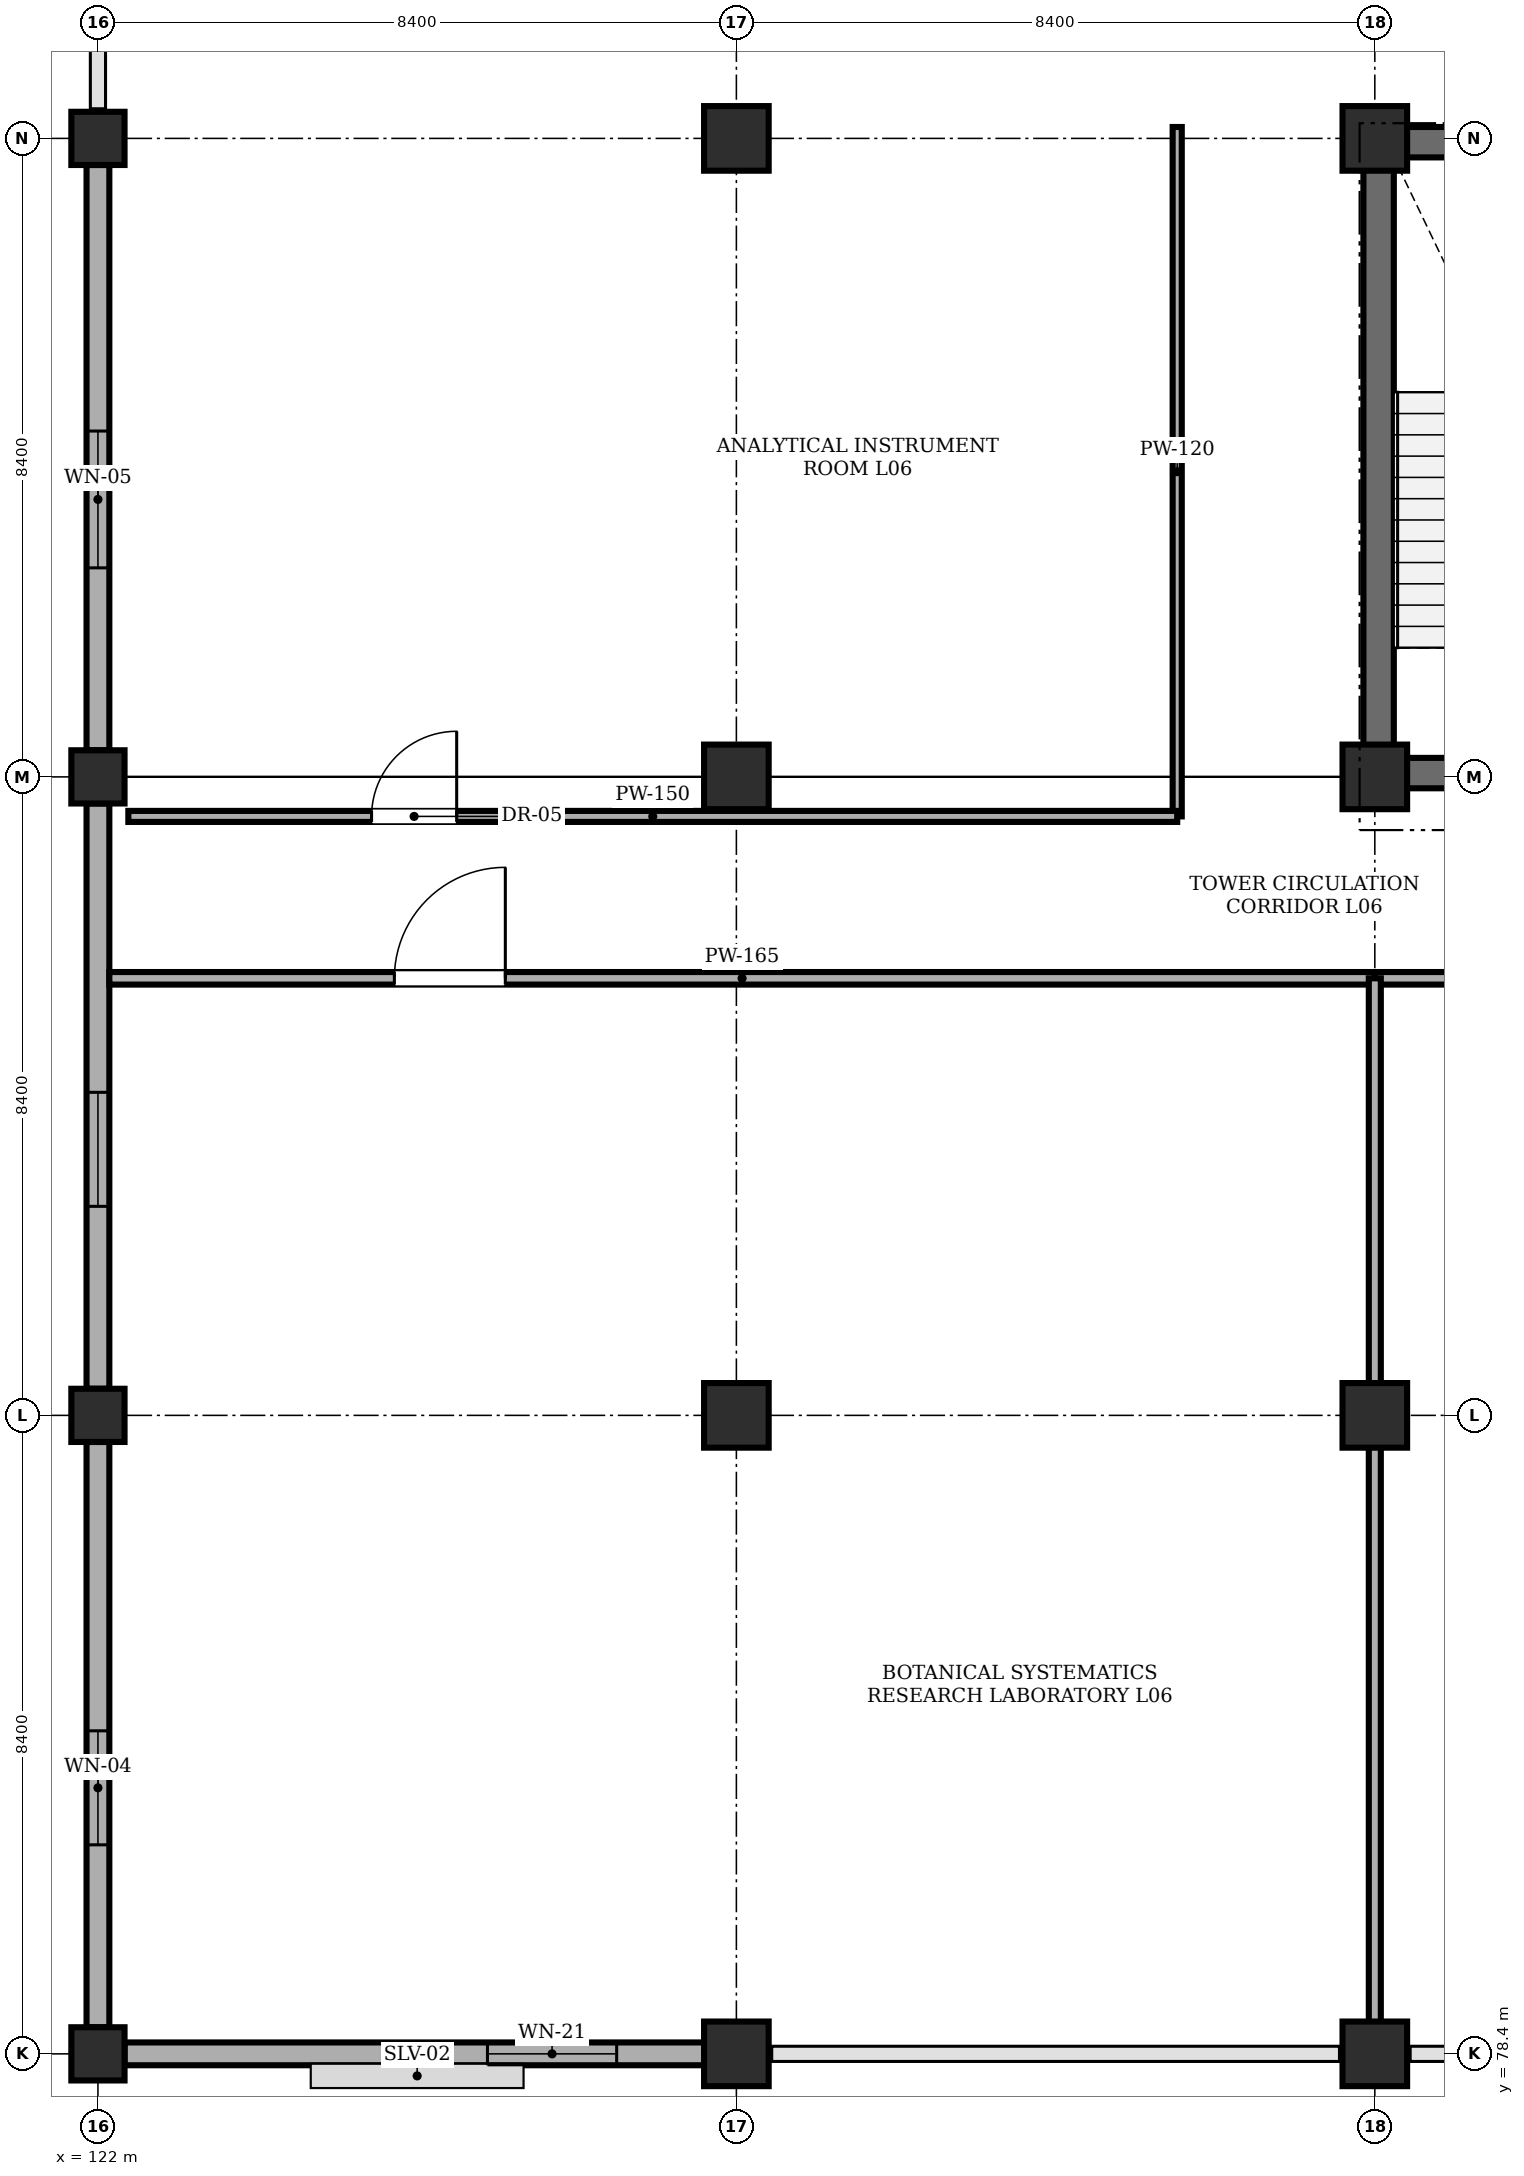
"""IFC4 building model, lengths in metres.
Left out: names, types, materials, properties, quantities, classifications, styles, units other than length and angle.
Written with IfcOpenShell. Run it as: python <this file> out.ifc"""

import sys

from ifc_helpers import new_model, si_unit, direction, frame, frame_2d, origin, origin_2d, place, context, subcontext, project, spatial, rectangle, extrude, element, fill, save


model = new_model("IFC4")
c1 = context("Model", 3, precision=1e-05, world=origin(), true_north=direction((0.0, 1.0)))
c2 = subcontext(c1, "Body", "Model", "MODEL_VIEW")
j1 = project(units=[si_unit("LENGTHUNIT", "METRE"), si_unit("PLANEANGLEUNIT", "RADIAN")], contexts=[c1])
p1 = place(None, origin())
s1 = spatial("IfcSite", under=j1, at=p1, CompositionType="ELEMENT")
p2 = place(p1, origin())
s2 = spatial("IfcBuilding", under=s1, at=p2, CompositionType="ELEMENT")
p3 = place(p2, frame((0.0, 0.0, 23.4)))
s3 = spatial("IfcBuildingStorey", under=s2, at=p3, CompositionType="ELEMENT", Elevation=23.4)
for number, where, z_axis, x_axis in (
    (1, (122.0, 78.4, 0.0), (0.0, 0.0, 1.0), (1.0, 0.0, 0.0)),
    (2, (122.0, 86.8, 0.0), (0.0, 0.0, 1.0), (1.0, 0.0, 0.0)),
    (3, (122.0, 95.2, 0.0), (0.0, 0.0, 1.0), (1.0, 0.0, 0.0)),
    (4, (122.0, 103.6, 0.0), (0.0, 0.0, 1.0), (1.0, 0.0, 0.0)),
):
    element("IfcColumn", number, at=place(p3, frame(where, z_axis=z_axis, x_axis=x_axis)), inside=s3, PredefinedType="COLUMN", context=c2, shape_type="SweptSolid", body=[
        extrude(rectangle(XDim=0.7, YDim=0.7, at=origin_2d()), origin(), (0.0, 0.0, 1.0), 4.0),
    ])
for number, where, z_axis, x_axis in (
    (5, (130.4, 78.4, 0.0), (0.0, 0.0, 1.0), (1.0, 0.0, 0.0)),
    (6, (130.4, 86.8, 0.0), (0.0, 0.0, 1.0), (1.0, 0.0, 0.0)),
    (7, (130.4, 95.2, 0.0), (0.0, 0.0, 1.0), (1.0, 0.0, 0.0)),
    (8, (130.4, 103.6, 0.0), (0.0, 0.0, 1.0), (1.0, 0.0, 0.0)),
    (9, (138.8, 78.4, 0.0), (0.0, 0.0, 1.0), (1.0, 0.0, 0.0)),
    (10, (138.8, 86.8, 0.0), (0.0, 0.0, 1.0), (1.0, 0.0, 0.0)),
    (11, (138.8, 95.2, 0.0), (0.0, 0.0, 1.0), (1.0, 0.0, 0.0)),
    (12, (138.8, 103.6, 0.0), (0.0, 0.0, 1.0), (1.0, 0.0, 0.0)),
):
    element("IfcColumn", number, at=place(p3, frame(where, z_axis=z_axis, x_axis=x_axis)), inside=s3, PredefinedType="COLUMN", context=c2, shape_type="SweptSolid", body=[
        extrude(rectangle(XDim=0.85, YDim=0.85, at=origin_2d()), origin(), (0.0, 0.0, 1.0), 4.0),
    ])
for number, where, z_axis, x_axis in (
    (13, (138.65, 95.25, 0.0), (0.0, 0.0, 1.0), (1.0, 0.0, 0.0)),
    (14, (138.65, 103.55, 0.0), (0.0, 0.0, 1.0), (1.0, 0.0, 0.0)),
):
    element("IfcWall", number, at=place(p3, frame(where, z_axis=z_axis, x_axis=x_axis)), inside=s3, PredefinedType="SHEAR", context=c2, shape_type="SweptSolid", body=[
        extrude(rectangle(XDim=3.9, YDim=0.4, at=frame_2d((1.95, 0.0))), origin(), (0.0, 0.0, 1.0), 4.0),
    ])
p4 = place(p3, frame((138.85, 95.45, 0.0), z_axis=(0.0, 0.0, 1.0), x_axis=(0.0, 1.0, 0.0)))
e15 = element("IfcWall", 15, at=p4, inside=s3, PredefinedType="SHEAR", context=c2, shape_type="SweptSolid", body=[
    extrude(rectangle(XDim=7.9, YDim=0.4, at=frame_2d((3.95, 0.0))), origin(), (0.0, 0.0, 1.0), 4.0),
])
p5 = place(p3, frame((129.975, 78.4, 0.0), z_axis=(0.0, 0.0, 1.0), x_axis=(-1.0, 0.0, 0.0)))
e16 = element("IfcWall", 16, at=p5, inside=s3, PredefinedType="STANDARD", context=c2, shape_type="SweptSolid", body=[
    extrude(rectangle(XDim=7.625, YDim=0.3, at=frame_2d((3.812, 0.0))), origin(), (0.0, 0.0, 1.0), 4.0),
])
p6 = place(p5, frame((1.15, 0.0, 0.95)))
e17 = element("IfcOpeningElement", 17, at=p6, cuts=e16, PredefinedType="OPENING", context=c2, shape_type="SweptSolid", body=[
    extrude(rectangle(XDim=1.7, YDim=2.05, at=frame_2d((0.85, 1.025))), frame((0.0, 0.16, 0.0), z_axis=(0.0, -1.0, 0.0), x_axis=(1.0, 0.0, 0.0)), (0.0, 0.0, 1.0), 0.32),
])
p7 = place(p3, frame((122.0, 78.75, 0.0), z_axis=(0.0, 0.0, 1.0), x_axis=(0.0, 1.0, 0.0)))
e18 = element("IfcWall", 18, at=p7, inside=s3, PredefinedType="STANDARD", context=c2, shape_type="SweptSolid", body=[
    extrude(rectangle(XDim=7.7, YDim=0.3, at=frame_2d((3.85, 0.0))), origin(), (0.0, 0.0, 1.0), 4.0),
])
p8 = place(p7, frame((2.4, 0.0, 0.95)))
e19 = element("IfcOpeningElement", 19, at=p8, cuts=e18, PredefinedType="OPENING", context=c2, shape_type="SweptSolid", body=[
    extrude(rectangle(XDim=1.5, YDim=1.8, at=frame_2d((0.75, 0.9))), frame((0.0, 0.16, 0.0), z_axis=(0.0, -1.0, 0.0), x_axis=(1.0, 0.0, 0.0)), (0.0, 0.0, 1.0), 0.32),
])
p9 = place(p3, frame((122.0, 87.15, 0.0), z_axis=(0.0, 0.0, 1.0), x_axis=(0.0, 1.0, 0.0)))
e20 = element("IfcWall", 20, at=p9, inside=s3, PredefinedType="STANDARD", context=c2, shape_type="SweptSolid", body=[
    extrude(rectangle(XDim=7.7, YDim=0.3, at=frame_2d((3.85, 0.0))), origin(), (0.0, 0.0, 1.0), 3.3),
])
p10 = place(p9, frame((2.4, 0.0, 0.95)))
e21 = element("IfcOpeningElement", 21, at=p10, cuts=e20, PredefinedType="OPENING", context=c2, shape_type="SweptSolid", body=[
    extrude(rectangle(XDim=1.5, YDim=1.8, at=frame_2d((0.75, 0.9))), frame((0.0, 0.16, 0.0), z_axis=(0.0, -1.0, 0.0), x_axis=(1.0, 0.0, 0.0)), (0.0, 0.0, 1.0), 0.32),
])
p11 = place(p3, frame((122.0, 95.55, 0.0), z_axis=(0.0, 0.0, 1.0), x_axis=(0.0, 1.0, 0.0)))
e22 = element("IfcWall", 22, at=p11, inside=s3, PredefinedType="STANDARD", context=c2, shape_type="SweptSolid", body=[
    extrude(rectangle(XDim=7.7, YDim=0.3, at=frame_2d((3.85, 0.0))), origin(), (0.0, 0.0, 1.0), 3.3),
])
p12 = place(p11, frame((2.4, 0.0, 1.0)))
e23 = element("IfcOpeningElement", 23, at=p12, cuts=e22, PredefinedType="OPENING", context=c2, shape_type="SweptSolid", body=[
    extrude(rectangle(XDim=1.8, YDim=1.8, at=frame_2d((0.9, 0.9))), frame((0.0, 0.16, 0.0), z_axis=(0.0, -1.0, 0.0), x_axis=(1.0, 0.0, 0.0)), (0.0, 0.0, 1.0), 0.32),
])
p13 = place(p3, frame((136.2, 94.68, 0.0), z_axis=(0.0, 0.0, 1.0), x_axis=(0.0, 1.0, 0.0)))
e24 = element("IfcWall", 24, at=p13, inside=s3, PredefinedType="PARTITIONING", context=c2, shape_type="SweptSolid", body=[
    extrude(rectangle(XDim=9.07, YDim=0.12, at=frame_2d((4.535, 0.0))), origin(), (0.0, 0.0, 1.0), 4.0),
])
p14 = place(p3, frame((122.4, 94.68, 0.0), z_axis=(0.0, 0.0, 1.0), x_axis=(1.0, 0.0, 0.0)))
e25 = element("IfcWall", 25, at=p14, inside=s3, PredefinedType="PARTITIONING", context=c2, shape_type="SweptSolid", body=[
    extrude(rectangle(XDim=13.8, YDim=0.145, at=frame_2d((6.9, 0.0))), origin(), (0.0, 0.0, 1.0), 4.0),
])
p15 = place(p14, frame((3.2, 0.0, 0.0)))
e26 = element("IfcOpeningElement", 26, at=p15, cuts=e25, PredefinedType="OPENING", context=c2, shape_type="SweptSolid", body=[
    extrude(rectangle(XDim=1.12, YDim=2.18, at=frame_2d((0.56, 1.09))), frame((0.0, 0.083, 0.0), z_axis=(0.0, -1.0, 0.0), x_axis=(1.0, 0.0, 0.0)), (0.0, 0.0, 1.0), 0.165),
])
p16 = place(p3, frame((122.15, 92.55, 0.0), z_axis=(0.0, 0.0, 1.0), x_axis=(1.0, 0.0, 0.0)))
e27 = element("IfcWall", 27, at=p16, inside=s3, PredefinedType="PARTITIONING", context=c2, shape_type="SweptSolid", body=[
    extrude(rectangle(XDim=16.65, YDim=0.165, at=frame_2d((8.325, 0.0))), origin(), (0.0, 0.0, 1.0), 4.0),
])
p17 = place(p16, frame((3.75, 0.0, 0.0)))
e28 = element("IfcOpeningElement", 28, at=p17, cuts=e27, PredefinedType="OPENING", context=c2, shape_type="SweptSolid", body=[
    extrude(rectangle(XDim=1.46, YDim=2.22, at=frame_2d((0.73, 1.11))), frame((0.0, 0.093, 0.0), z_axis=(0.0, -1.0, 0.0), x_axis=(1.0, 0.0, 0.0)), (0.0, 0.0, 1.0), 0.185),
])
p18 = place(p3, frame((138.8, 92.55, 0.0), z_axis=(0.0, 0.0, 1.0), x_axis=(1.0, 0.0, 0.0)))
e29 = element("IfcWall", 29, at=p18, inside=s3, PredefinedType="PARTITIONING", context=c2, shape_type="SweptSolid", body=[
    extrude(rectangle(XDim=8.4, YDim=0.165, at=frame_2d((4.2, 0.0))), origin(), (0.0, 0.0, 1.0), 4.0),
])
p19 = place(p18, frame((3.4, 0.0, 0.0)))
e30 = element("IfcOpeningElement", 30, at=p19, cuts=e29, PredefinedType="OPENING", context=c2, shape_type="SweptSolid", body=[
    extrude(rectangle(XDim=1.12, YDim=2.18, at=frame_2d((0.56, 1.09))), frame((0.0, 0.093, 0.0), z_axis=(0.0, -1.0, 0.0), x_axis=(1.0, 0.0, 0.0)), (0.0, 0.0, 1.0), 0.185),
])
p20 = place(p3, frame((138.8, 78.55, 0.0), z_axis=(0.0, 0.0, 1.0), x_axis=(0.0, 1.0, 0.0)))
e31 = element("IfcWall", 31, at=p20, inside=s3, PredefinedType="PARTITIONING", context=c2, shape_type="SweptSolid", body=[
    extrude(rectangle(XDim=14.0, YDim=0.158, at=frame_2d((7.0, 0.0))), origin(), (0.0, 0.0, 1.0), 3.3),
])
p21 = place(p6, origin())
e32 = element("IfcWindow", 32, at=p21, inside=s3, PartitioningType="DOUBLE_PANEL_VERTICAL", PredefinedType="WINDOW", context=c2, shape_type="SweptSolid", body=[
    extrude(rectangle(XDim=1.7, YDim=2.05, at=frame_2d((0.85, 1.025))), frame((0.0, 0.03, 0.0), z_axis=(0.0, -1.0, 0.0), x_axis=(1.0, 0.0, 0.0)), (0.0, 0.0, 1.0), 0.06),
])
fill(e17, e32)
p22 = place(p8, origin())
e33 = element("IfcWindow", 33, at=p22, inside=s3, PartitioningType="DOUBLE_PANEL_VERTICAL", PredefinedType="WINDOW", context=c2, shape_type="SweptSolid", body=[
    extrude(rectangle(XDim=1.5, YDim=1.8, at=frame_2d((0.75, 0.9))), frame((0.0, 0.03, 0.0), z_axis=(0.0, -1.0, 0.0), x_axis=(1.0, 0.0, 0.0)), (0.0, 0.0, 1.0), 0.06),
])
fill(e19, e33)
p23 = place(p10, origin())
e34 = element("IfcWindow", 34, at=p23, inside=s3, PartitioningType="DOUBLE_PANEL_VERTICAL", PredefinedType="WINDOW", context=c2, shape_type="SweptSolid", body=[
    extrude(rectangle(XDim=1.5, YDim=1.8, at=frame_2d((0.75, 0.9))), frame((0.0, 0.03, 0.0), z_axis=(0.0, -1.0, 0.0), x_axis=(1.0, 0.0, 0.0)), (0.0, 0.0, 1.0), 0.06),
])
fill(e21, e34)
p24 = place(p12, origin())
e35 = element("IfcWindow", 35, at=p24, inside=s3, PartitioningType="DOUBLE_PANEL_VERTICAL", PredefinedType="WINDOW", context=c2, shape_type="SweptSolid", body=[
    extrude(rectangle(XDim=1.8, YDim=1.8, at=frame_2d((0.9, 0.9))), frame((0.0, 0.03, 0.0), z_axis=(0.0, -1.0, 0.0), x_axis=(1.0, 0.0, 0.0)), (0.0, 0.0, 1.0), 0.06),
])
fill(e23, e35)
p25 = place(p15, origin())
e36 = element("IfcDoor", 36, at=p25, inside=s3, OperationType="SINGLE_SWING_RIGHT", PredefinedType="DOOR", context=c2, shape_type="SweptSolid", body=[
    extrude(rectangle(XDim=1.12, YDim=2.18, at=frame_2d((0.56, 1.09))), frame((0.0, 0.025, 0.0), z_axis=(0.0, -1.0, 0.0), x_axis=(1.0, 0.0, 0.0)), (0.0, 0.0, 1.0), 0.05),
])
fill(e26, e36)
p26 = place(p17, origin())
e37 = element("IfcDoor", 37, at=p26, inside=s3, OperationType="SINGLE_SWING_RIGHT", PredefinedType="DOOR", context=c2, shape_type="SweptSolid", body=[
    extrude(rectangle(XDim=1.46, YDim=2.22, at=frame_2d((0.73, 1.11))), frame((0.0, 0.025, 0.0), z_axis=(0.0, -1.0, 0.0), x_axis=(1.0, 0.0, 0.0)), (0.0, 0.0, 1.0), 0.05),
])
fill(e28, e37)
save(model, sys.argv[1])
